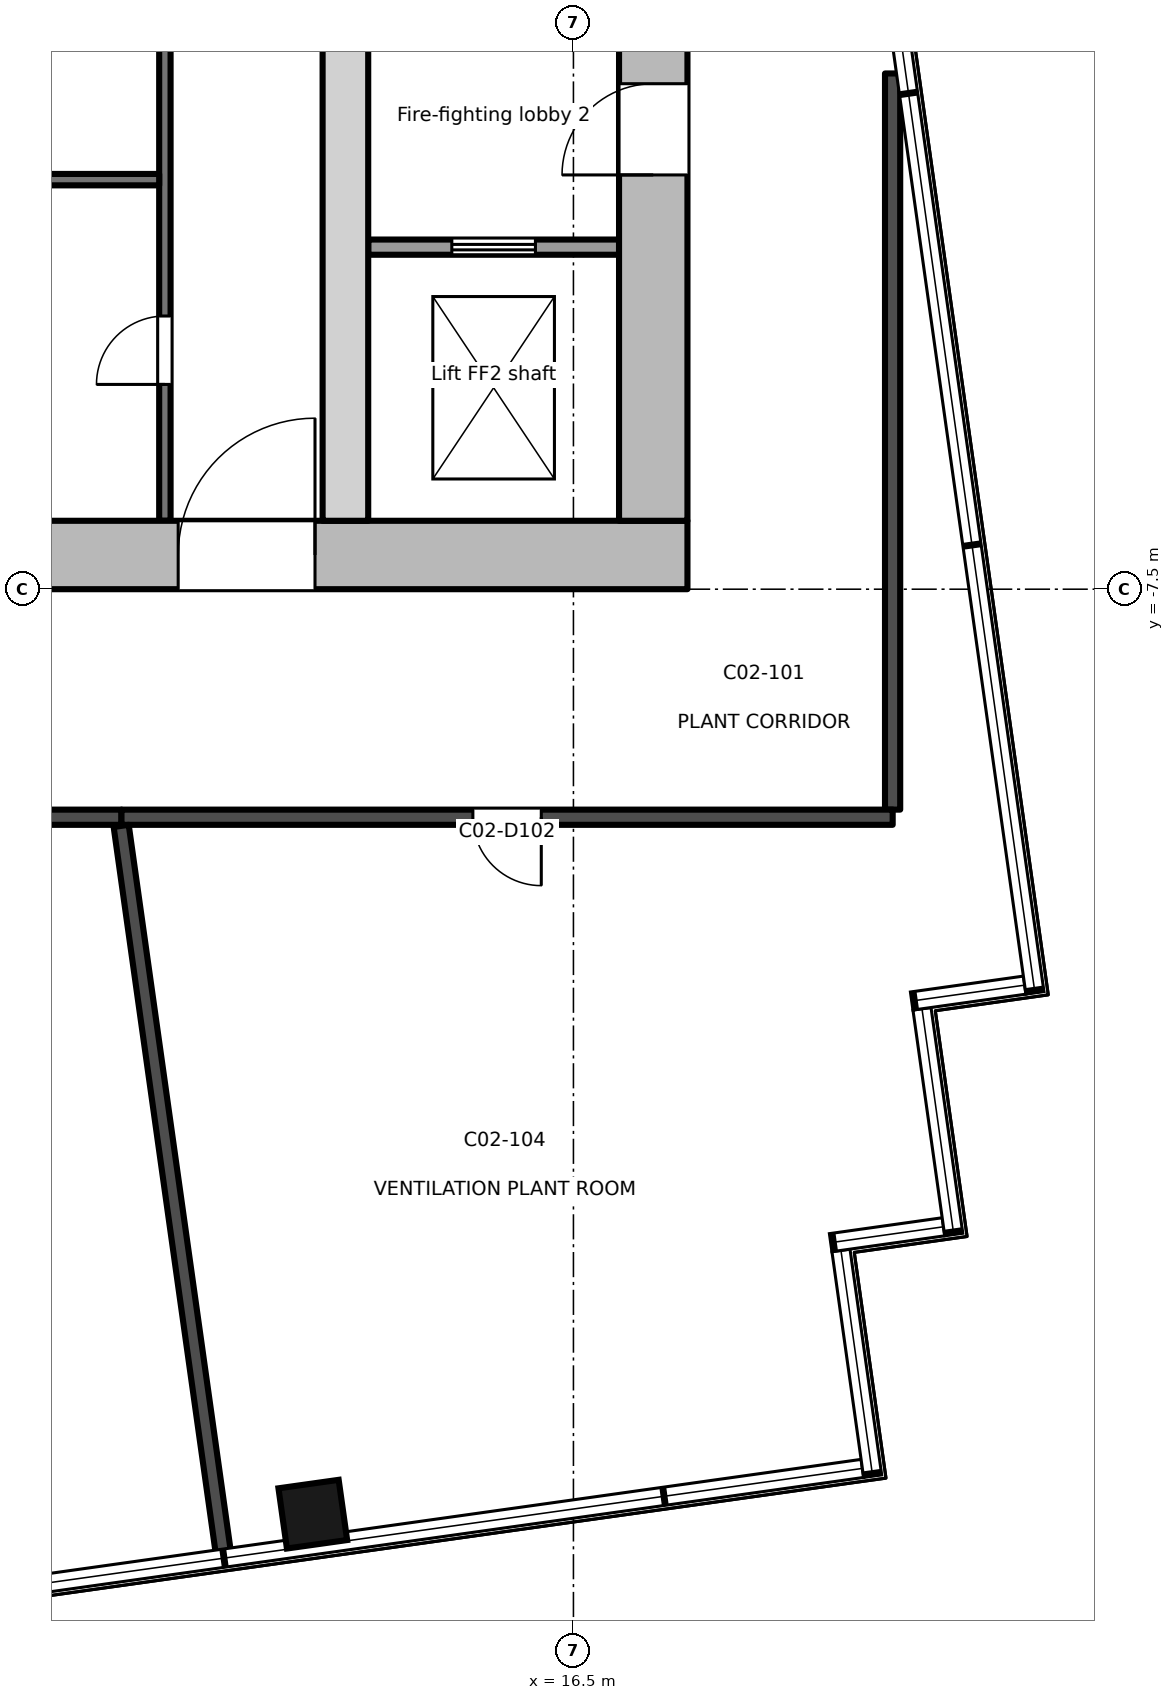
"""IFC4 building model, lengths in metres.
Left out: names, types, materials, properties, quantities, classifications, styles, units other than length and angle.
Written with IfcOpenShell. Run it as: python <this file> out.ifc"""

import sys

from ifc_helpers import new_model, si_unit, direction, frame, frame_2d, origin, origin_2d, place, context, subcontext, project, spatial, rectangle, extrude, element, fill, save


model = new_model("IFC4")
c1 = context("Model", 3, precision=1e-05, world=origin(), true_north=direction((0.0, 1.0)))
c2 = subcontext(c1, "Body", "Model", "MODEL_VIEW")
j1 = project(units=[si_unit("LENGTHUNIT", "METRE"), si_unit("PLANEANGLEUNIT", "RADIAN")], contexts=[c1])
p1 = place(None, origin())
s1 = spatial("IfcSite", under=j1, at=p1, CompositionType="ELEMENT")
p2 = place(p1, origin())
s2 = spatial("IfcBuilding", under=s1, at=p2, CompositionType="ELEMENT")
p3 = place(p2, frame((0.0, 0.0, 296.3)))
s3 = spatial("IfcBuildingStorey", under=s2, at=p3, CompositionType="ELEMENT", Elevation=296.3)
p4 = place(p3, frame((13.071, -19.669, -0.2), z_axis=(0.0, 0.0, 1.0), x_axis=(0.990265639562, 0.139190384377, 0.0)))
e1 = element("IfcColumn", 1, at=p4, inside=s3, PredefinedType="COLUMN", context=c2, shape_type="SweptSolid", body=[
    extrude(rectangle(XDim=0.8, YDim=0.8, at=origin_2d()), origin(), (0.0, 0.0, 1.0), 4.0),
])
p5 = place(p3, frame((-18.0, -7.05, -0.2), z_axis=(0.0, 0.0, 1.0), x_axis=(1.0, 0.0, 0.0)))
e2 = element("IfcWall", 2, at=p5, inside=s3, PredefinedType="SHEAR", context=c2, shape_type="SweptSolid", body=[
    extrude(rectangle(XDim=36.0, YDim=0.9, at=frame_2d((18.0, 0.0))), origin(), (0.0, 0.0, 1.0), 4.0),
])
p6 = place(p5, frame((11.3, 0.0, 0.2)))
e3 = element("IfcOpeningElement", 3, at=p6, cuts=e2, PredefinedType="OPENING", context=c2, shape_type="SweptSolid", body=[
    extrude(rectangle(XDim=1.8, YDim=2.1, at=frame_2d((0.9, 1.05))), frame((0.0, 0.46, 0.0), z_axis=(0.0, -1.0, 0.0), x_axis=(1.0, 0.0, 0.0)), (0.0, 0.0, 1.0), 0.921),
])
p7 = place(p5, frame((20.3, 0.0, 0.2)))
e4 = element("IfcOpeningElement", 4, at=p7, cuts=e2, PredefinedType="OPENING", context=c2, shape_type="SweptSolid", body=[
    extrude(rectangle(XDim=1.8, YDim=2.1, at=frame_2d((0.9, 1.05))), frame((0.0, 0.46, 0.0), z_axis=(0.0, -1.0, 0.0), x_axis=(1.0, 0.0, 0.0)), (0.0, 0.0, 1.0), 0.921),
])
p8 = place(p5, frame((29.3, 0.0, 0.2)))
e5 = element("IfcOpeningElement", 5, at=p8, cuts=e2, PredefinedType="OPENING", context=c2, shape_type="SweptSolid", body=[
    extrude(rectangle(XDim=1.8, YDim=2.1, at=frame_2d((0.9, 1.05))), frame((0.0, 0.46, 0.0), z_axis=(0.0, -1.0, 0.0), x_axis=(1.0, 0.0, 0.0)), (0.0, 0.0, 1.0), 0.921),
])
p9 = place(p3, frame((17.55, -6.6, -0.2), z_axis=(0.0, 0.0, 1.0), x_axis=(0.0, 1.0, 0.0)))
e6 = element("IfcWall", 6, at=p9, inside=s3, PredefinedType="SHEAR", context=c2, shape_type="SweptSolid", body=[
    extrude(rectangle(XDim=13.2, YDim=0.9, at=frame_2d((6.6, 0.0))), origin(), (0.0, 0.0, 1.0), 4.0),
])
p10 = place(p9, frame((4.55, 0.0, 0.2)))
e7 = element("IfcOpeningElement", 7, at=p10, cuts=e6, PredefinedType="OPENING", context=c2, shape_type="SweptSolid", body=[
    extrude(rectangle(XDim=1.2, YDim=2.1, at=frame_2d((0.6, 1.05))), frame((0.0, 0.46, 0.0), z_axis=(0.0, -1.0, 0.0), x_axis=(1.0, 0.0, 0.0)), (0.0, 0.0, 1.0), 0.921),
])
p11 = place(p3, frame((13.5, -6.6, -0.2), z_axis=(0.0, 0.0, 1.0), x_axis=(0.0, 1.0, 0.0)))
e8 = element("IfcWall", 8, at=p11, inside=s3, PredefinedType="SHEAR", context=c2, shape_type="SweptSolid", body=[
    extrude(rectangle(XDim=13.2, YDim=0.6, at=frame_2d((6.6, 0.0))), origin(), (0.0, 0.0, 1.0), 4.0),
])
p12 = place(p3, frame((13.8, -3.0, 0.0), z_axis=(0.0, 0.0, 1.0), x_axis=(1.0, 0.0, 0.0)))
e9 = element("IfcWall", 9, at=p12, inside=s3, PredefinedType="PARTITIONING", context=c2, shape_type="SweptSolid", body=[
    extrude(rectangle(XDim=3.3, YDim=0.2, at=frame_2d((1.65, 0.0))), origin(), (0.0, 0.0, 1.0), 3.8),
])
p13 = place(p12, frame((1.1, 0.0, 0.0)))
e10 = element("IfcOpeningElement", 10, at=p13, cuts=e9, PredefinedType="OPENING", context=c2, shape_type="SweptSolid", body=[
    extrude(rectangle(XDim=1.1, YDim=2.1, at=frame_2d((0.55, 1.05))), frame((0.0, 0.111, 0.0), z_axis=(0.0, -1.0, 0.0), x_axis=(1.0, 0.0, 0.0)), (0.0, 0.0, 1.0), 0.221),
])
p14 = place(p3, frame((11.125, -6.6, 0.0), z_axis=(0.0, 0.0, 1.0), x_axis=(0.0, 1.0, 0.0)))
e11 = element("IfcWall", 11, at=p14, inside=s3, PredefinedType="PARTITIONING", context=c2, shape_type="SweptSolid", body=[
    extrude(rectangle(XDim=13.2, YDim=0.15, at=frame_2d((6.6, 0.0))), origin(), (0.0, 0.0, 1.0), 3.8),
])
p15 = place(p14, frame((1.794, 0.0, 0.0)))
e12 = element("IfcOpeningElement", 12, at=p15, cuts=e11, PredefinedType="OPENING", context=c2, shape_type="SweptSolid", body=[
    extrude(rectangle(XDim=0.9, YDim=2.1, at=frame_2d((0.45, 1.05))), frame((0.0, 0.085, 0.0), z_axis=(0.0, -1.0, 0.0), x_axis=(1.0, 0.0, 0.0)), (0.0, 0.0, 1.0), 0.171),
])
p16 = place(p14, frame((6.216, 0.0, 0.0)))
e13 = element("IfcOpeningElement", 13, at=p16, cuts=e11, PredefinedType="OPENING", context=c2, shape_type="SweptSolid", body=[
    extrude(rectangle(XDim=0.9, YDim=2.1, at=frame_2d((0.45, 1.05))), frame((0.0, 0.085, 0.0), z_axis=(0.0, -1.0, 0.0), x_axis=(1.0, 0.0, 0.0)), (0.0, 0.0, 1.0), 0.171),
])
p17 = place(p14, frame((10.572, 0.0, 0.0)))
e14 = element("IfcOpeningElement", 14, at=p17, cuts=e11, PredefinedType="OPENING", context=c2, shape_type="SweptSolid", body=[
    extrude(rectangle(XDim=0.9, YDim=2.1, at=frame_2d((0.45, 1.05))), frame((0.0, 0.085, 0.0), z_axis=(0.0, -1.0, 0.0), x_axis=(1.0, 0.0, 0.0)), (0.0, 0.0, 1.0), 0.171),
])
p18 = place(p3, frame((4.8, -2.112, 0.0), z_axis=(0.0, 0.0, 1.0), x_axis=(1.0, 0.0, 0.0)))
e15 = element("IfcWall", 15, at=p18, inside=s3, PredefinedType="PARTITIONING", context=c2, shape_type="SweptSolid", body=[
    extrude(rectangle(XDim=6.25, YDim=0.15, at=frame_2d((3.125, 0.0))), origin(), (0.0, 0.0, 1.0), 3.8),
])
p19 = place(p3, frame((10.554, -10.5, 0.0), z_axis=(0.0, 0.0, 1.0), x_axis=(-1.0, 0.0, 0.0)))
e16 = element("IfcWall", 16, at=p19, inside=s3, PredefinedType="PARTITIONING", context=c2, shape_type="SweptSolid", body=[
    extrude(rectangle(XDim=14.759, YDim=0.2, at=frame_2d((7.379, 0.0))), origin(), (0.0, 0.0, 1.0), 3.19),
])
p20 = place(p19, frame((6.929, 0.0, 0.0)))
e17 = element("IfcOpeningElement", 17, at=p20, cuts=e16, PredefinedType="OPENING", context=c2, shape_type="SweptSolid", body=[
    extrude(rectangle(XDim=0.9, YDim=2.1, at=frame_2d((0.45, 1.05))), frame((0.0, 0.111, 0.0), z_axis=(0.0, -1.0, 0.0), x_axis=(1.0, 0.0, 0.0)), (0.0, 0.0, 1.0), 0.221),
])
p21 = place(p3, frame((20.699, -0.715, 0.0), z_axis=(0.0, 0.0, 1.0), x_axis=(0.0, -1.0, 0.0)))
e18 = element("IfcWall", 18, at=p21, inside=s3, PredefinedType="PARTITIONING", context=c2, shape_type="SweptSolid", body=[
    extrude(rectangle(XDim=9.685, YDim=0.2, at=frame_2d((4.842, 0.0))), origin(), (0.0, 0.0, 1.0), 3.8),
])
p22 = place(p3, frame((20.7, -10.5, 0.0), z_axis=(0.0, 0.0, 1.0), x_axis=(-1.0, 0.0, 0.0)))
e19 = element("IfcWall", 19, at=p22, inside=s3, PredefinedType="PARTITIONING", context=c2, shape_type="SweptSolid", body=[
    extrude(rectangle(XDim=10.146, YDim=0.2, at=frame_2d((5.073, 0.0))), origin(), (0.0, 0.0, 1.0), 3.2),
])
p23 = place(p22, frame((4.623, 0.0, 0.0)))
e20 = element("IfcOpeningElement", 20, at=p23, cuts=e19, PredefinedType="OPENING", context=c2, shape_type="SweptSolid", body=[
    extrude(rectangle(XDim=0.9, YDim=2.1, at=frame_2d((0.45, 1.05))), frame((0.0, 0.111, 0.0), z_axis=(0.0, -1.0, 0.0), x_axis=(1.0, 0.0, 0.0)), (0.0, 0.0, 1.0), 0.221),
])
p24 = place(p3, frame((10.55, -10.614, 0.0), z_axis=(0.0, 0.0, 1.0), x_axis=(0.139161669219, -0.990269675301, 0.0)))
e21 = element("IfcWall", 21, at=p24, inside=s3, PredefinedType="PARTITIONING", context=c2, shape_type="SweptSolid", body=[
    extrude(rectangle(XDim=9.637, YDim=0.2, at=frame_2d((4.818, 0.0))), origin(), (0.0, 0.0, 1.0), 3.8),
])
p25 = place(p13, origin())
e22 = element("IfcDoor", 22, at=p25, inside=s3, OperationType="DOUBLE_DOOR_SLIDING", PredefinedType="DOOR", context=c2, shape_type="SweptSolid", body=[
    extrude(rectangle(XDim=1.1, YDim=2.1, at=frame_2d((0.55, 1.05))), frame((0.0, 0.025, 0.0), z_axis=(0.0, -1.0, 0.0), x_axis=(1.0, 0.0, 0.0)), (0.0, 0.0, 1.0), 0.05),
])
fill(e10, e22)
p26 = place(p10, origin())
e23 = element("IfcDoor", 23, at=p26, inside=s3, OperationType="SINGLE_SWING_LEFT", PredefinedType="DOOR", context=c2, shape_type="SweptSolid", body=[
    extrude(rectangle(XDim=1.2, YDim=2.1, at=frame_2d((0.6, 1.05))), frame((0.0, 0.025, 0.0), z_axis=(0.0, -1.0, 0.0), x_axis=(1.0, 0.0, 0.0)), (0.0, 0.0, 1.0), 0.05),
])
fill(e7, e23)
p27 = place(p15, origin())
e24 = element("IfcDoor", 24, at=p27, inside=s3, OperationType="SINGLE_SWING_LEFT", PredefinedType="DOOR", context=c2, shape_type="SweptSolid", body=[
    extrude(rectangle(XDim=0.9, YDim=2.1, at=frame_2d((0.45, 1.05))), frame((0.0, 0.025, 0.0), z_axis=(0.0, -1.0, 0.0), x_axis=(1.0, 0.0, 0.0)), (0.0, 0.0, 1.0), 0.05),
])
fill(e12, e24)
p28 = place(p8, origin())
e25 = element("IfcDoor", 25, at=p28, inside=s3, OperationType="SINGLE_SWING_RIGHT", PredefinedType="DOOR", context=c2, shape_type="SweptSolid", body=[
    extrude(rectangle(XDim=1.8, YDim=2.1, at=frame_2d((0.9, 1.05))), frame((0.0, 0.025, 0.0), z_axis=(0.0, -1.0, 0.0), x_axis=(1.0, 0.0, 0.0)), (0.0, 0.0, 1.0), 0.05),
])
fill(e5, e25)
p29 = place(p23, origin())
e26 = element("IfcDoor", 26, at=p29, inside=s3, OperationType="SINGLE_SWING_LEFT", PredefinedType="DOOR", context=c2, shape_type="SweptSolid", body=[
    extrude(rectangle(XDim=0.9, YDim=2.1, at=frame_2d((0.45, 1.05))), frame((0.0, 0.025, 0.0), z_axis=(0.0, -1.0, 0.0), x_axis=(1.0, 0.0, 0.0)), (0.0, 0.0, 1.0), 0.05),
])
fill(e20, e26)
save(model, sys.argv[1])
